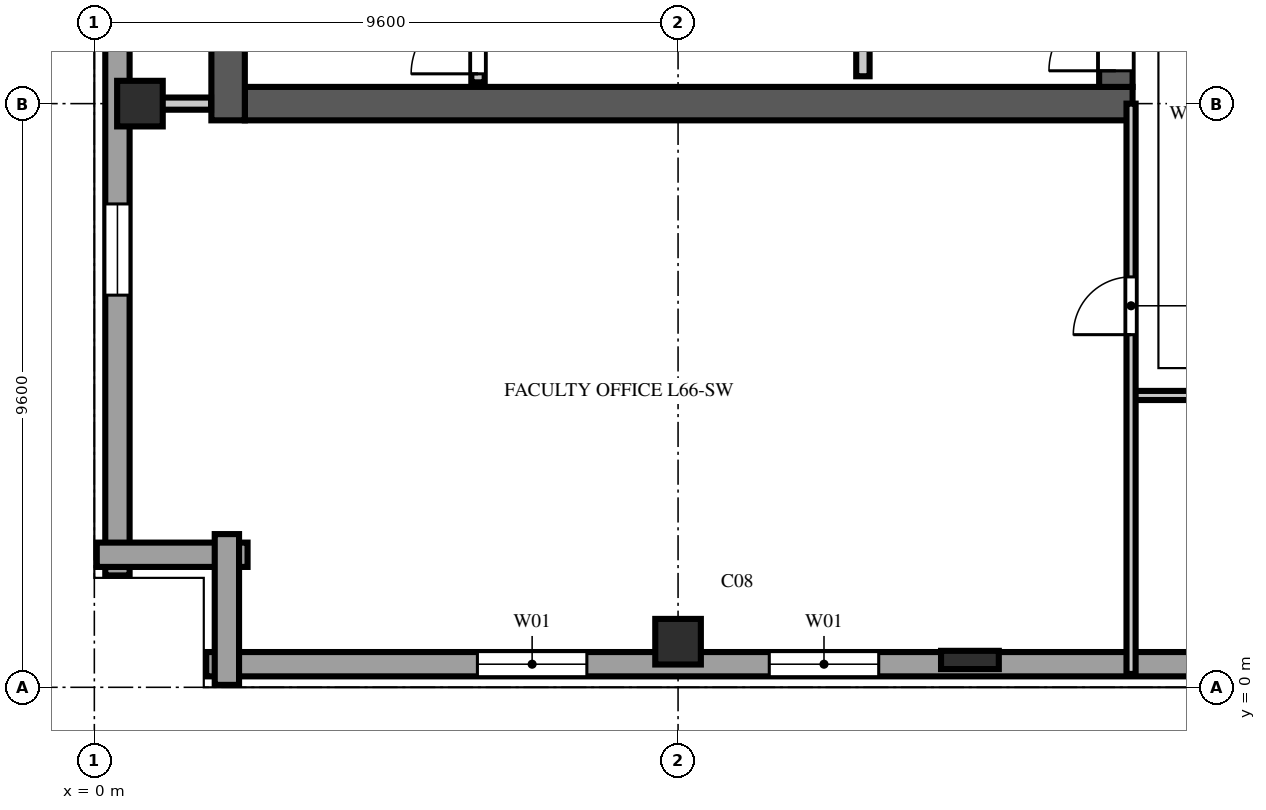
"""IFC4 building model, lengths in metres.
Left out: names, types, materials, properties, quantities, classifications, styles, units other than length and angle.
Written with IfcOpenShell. Run it as: python <this file> out.ifc"""

import sys

from ifc_helpers import new_model, si_unit, direction, frame, frame_2d, origin, origin_2d, place, context, subcontext, project, spatial, rectangle, extrude, element, fill, save


model = new_model("IFC4")
c1 = context("Model", 3, precision=1e-05, world=origin(), true_north=direction((0.0, 1.0)))
c2 = subcontext(c1, "Body", "Model", "MODEL_VIEW")
j1 = project(units=[si_unit("LENGTHUNIT", "METRE"), si_unit("PLANEANGLEUNIT", "RADIAN")], contexts=[c1])
p1 = place(None, origin())
s1 = spatial("IfcSite", under=j1, at=p1, CompositionType="ELEMENT")
p2 = place(p1, origin())
s2 = spatial("IfcBuilding", under=s1, at=p2, CompositionType="ELEMENT")
p3 = place(p2, frame((0.0, 0.0, 261.0)))
s3 = spatial("IfcBuildingStorey", under=s2, at=p3, CompositionType="ELEMENT", Elevation=261.0)
p4 = place(p3, frame((2.475, 9.6, 0.0), z_axis=(0.0, 0.0, 1.0), x_axis=(1.0, 0.0, 0.0)))
e1 = element("IfcWall", 1, at=p4, inside=s3, PredefinedType="SHEAR", context=c2, shape_type="SweptSolid", body=[
    extrude(rectangle(XDim=14.6, YDim=0.55, at=frame_2d((7.3, 0.0))), origin(), (0.0, 0.0, 1.0), 4.54),
])
p5 = place(p3, frame((2.2, 9.325, 0.0), z_axis=(0.0, 0.0, 1.0), x_axis=(0.0, 1.0, 0.0)))
e2 = element("IfcWall", 2, at=p5, inside=s3, PredefinedType="SHEAR", context=c2, shape_type="SweptSolid", body=[
    extrude(rectangle(XDim=38.95, YDim=0.55, at=frame_2d((19.475, 0.0))), origin(), (0.0, 0.0, 1.0), 4.54),
])
p6 = place(p3, frame((16.8, 9.875, 0.0), z_axis=(0.0, 0.0, 1.0), x_axis=(0.0, 1.0, 0.0)))
e3 = element("IfcWall", 3, at=p6, inside=s3, PredefinedType="SHEAR", context=c2, shape_type="SweptSolid", body=[
    extrude(rectangle(XDim=12.525, YDim=0.55, at=frame_2d((6.262, 0.0))), origin(), (0.0, 0.0, 1.0), 4.54),
])
p7 = place(p6, frame((0.265, 0.0, 0.0)))
e4 = element("IfcOpeningElement", 4, at=p7, cuts=e3, PredefinedType="OPENING", context=c2, shape_type="SweptSolid", body=[
    extrude(rectangle(XDim=1.1, YDim=2.2, at=frame_2d((0.55, 1.1))), frame((0.0, 0.287, 0.0), z_axis=(0.0, -1.0, 0.0), x_axis=(1.0, 0.0, 0.0)), (0.0, 0.0, 1.0), 0.574),
])
for number, where, z_axis, x_axis in (
    (5, (0.75, 9.6, 0.0), (0.0, 0.0, 1.0), (1.0, 0.0, 0.0)),
    (6, (9.6, 0.75, 0.0), (0.0, 0.0, 1.0), (1.0, 0.0, 0.0)),
):
    element("IfcColumn", number, at=place(p3, frame(where, z_axis=z_axis, x_axis=x_axis)), inside=s3, PredefinedType="COLUMN", context=c2, shape_type="SweptSolid", body=[
        extrude(rectangle(XDim=0.75, YDim=0.75, at=origin_2d()), origin(), (0.0, 0.0, 1.0), 4.8),
    ])
p8 = place(p3, frame((14.4, 0.45, 0.0), z_axis=(0.0, 0.0, 1.0), x_axis=(1.0, 0.0, 0.0)))
e7 = element("IfcColumn", 7, at=p8, inside=s3, PredefinedType="PILASTER", context=c2, shape_type="SweptSolid", body=[
    extrude(rectangle(XDim=0.95, YDim=0.3, at=origin_2d()), origin(), (0.0, 0.0, 1.0), 4.8),
])
p9 = place(p3, frame((1.84, 0.38, 0.0), z_axis=(0.0, 0.0, 1.0), x_axis=(1.0, 0.0, 0.0)))
e8 = element("IfcWall", 8, at=p9, inside=s3, PredefinedType="SOLIDWALL", context=c2, shape_type="SweptSolid", body=[
    extrude(rectangle(XDim=44.32, YDim=0.4, at=frame_2d((22.16, 0.0))), origin(), (0.0, 0.0, 1.0), 4.54),
])
p10 = place(p9, frame((4.46, 0.0, 0.85)))
e9 = element("IfcOpeningElement", 9, at=p10, cuts=e8, PredefinedType="OPENING", context=c2, shape_type="SweptSolid", body=[
    extrude(rectangle(XDim=1.8, YDim=1.85, at=frame_2d((0.9, 0.925))), frame((0.0, 0.212, 0.0), z_axis=(0.0, -1.0, 0.0), x_axis=(1.0, 0.0, 0.0)), (0.0, 0.0, 1.0), 0.424),
])
p11 = place(p9, frame((9.26, 0.0, 0.85)))
e10 = element("IfcOpeningElement", 10, at=p11, cuts=e8, PredefinedType="OPENING", context=c2, shape_type="SweptSolid", body=[
    extrude(rectangle(XDim=1.8, YDim=1.85, at=frame_2d((0.9, 0.925))), frame((0.0, 0.212, 0.0), z_axis=(0.0, -1.0, 0.0), x_axis=(1.0, 0.0, 0.0)), (0.0, 0.0, 1.0), 0.424),
])
p12 = place(p9, frame((18.86, 0.0, 0.85)))
e11 = element("IfcOpeningElement", 11, at=p12, cuts=e8, PredefinedType="OPENING", context=c2, shape_type="SweptSolid", body=[
    extrude(rectangle(XDim=1.8, YDim=1.85, at=frame_2d((0.9, 0.925))), frame((0.0, 0.212, 0.0), z_axis=(0.0, -1.0, 0.0), x_axis=(1.0, 0.0, 0.0)), (0.0, 0.0, 1.0), 0.424),
])
p13 = place(p9, frame((28.46, 0.0, 0.85)))
e12 = element("IfcOpeningElement", 12, at=p13, cuts=e8, PredefinedType="OPENING", context=c2, shape_type="SweptSolid", body=[
    extrude(rectangle(XDim=1.8, YDim=1.85, at=frame_2d((0.9, 0.925))), frame((0.0, 0.212, 0.0), z_axis=(0.0, -1.0, 0.0), x_axis=(1.0, 0.0, 0.0)), (0.0, 0.0, 1.0), 0.424),
])
p14 = place(p9, frame((33.26, 0.0, 0.85)))
e13 = element("IfcOpeningElement", 13, at=p14, cuts=e8, PredefinedType="OPENING", context=c2, shape_type="SweptSolid", body=[
    extrude(rectangle(XDim=1.8, YDim=1.85, at=frame_2d((0.9, 0.925))), frame((0.0, 0.212, 0.0), z_axis=(0.0, -1.0, 0.0), x_axis=(1.0, 0.0, 0.0)), (0.0, 0.0, 1.0), 0.424),
])
p15 = place(p9, frame((38.06, 0.0, 0.85)))
e14 = element("IfcOpeningElement", 14, at=p15, cuts=e8, PredefinedType="OPENING", context=c2, shape_type="SweptSolid", body=[
    extrude(rectangle(XDim=1.8, YDim=1.85, at=frame_2d((0.9, 0.925))), frame((0.0, 0.212, 0.0), z_axis=(0.0, -1.0, 0.0), x_axis=(1.0, 0.0, 0.0)), (0.0, 0.0, 1.0), 0.424),
])
p16 = place(p3, frame((0.38, 46.16, 0.0), z_axis=(0.0, 0.0, 1.0), x_axis=(0.0, -1.0, 0.0)))
e15 = element("IfcWall", 15, at=p16, inside=s3, PredefinedType="SOLIDWALL", context=c2, shape_type="SweptSolid", body=[
    extrude(rectangle(XDim=44.32, YDim=0.4, at=frame_2d((22.16, 0.0))), origin(), (0.0, 0.0, 1.0), 4.54),
])
p17 = place(p16, frame((4.885, 0.0, 0.9)))
e16 = element("IfcOpeningElement", 16, at=p17, cuts=e15, PredefinedType="OPENING", context=c2, shape_type="SweptSolid", body=[
    extrude(rectangle(XDim=0.95, YDim=1.85, at=frame_2d((0.475, 0.925))), frame((0.0, 0.212, 0.0), z_axis=(0.0, -1.0, 0.0), x_axis=(1.0, 0.0, 0.0)), (0.0, 0.0, 1.0), 0.424),
])
p18 = place(p16, frame((9.41, 0.0, 0.9)))
e17 = element("IfcOpeningElement", 17, at=p18, cuts=e15, PredefinedType="OPENING", context=c2, shape_type="SweptSolid", body=[
    extrude(rectangle(XDim=1.5, YDim=1.85, at=frame_2d((0.75, 0.925))), frame((0.0, 0.212, 0.0), z_axis=(0.0, -1.0, 0.0), x_axis=(1.0, 0.0, 0.0)), (0.0, 0.0, 1.0), 0.424),
])
p19 = place(p16, frame((14.485, 0.0, 0.9)))
e18 = element("IfcOpeningElement", 18, at=p19, cuts=e15, PredefinedType="OPENING", context=c2, shape_type="SweptSolid", body=[
    extrude(rectangle(XDim=0.95, YDim=1.85, at=frame_2d((0.475, 0.925))), frame((0.0, 0.212, 0.0), z_axis=(0.0, -1.0, 0.0), x_axis=(1.0, 0.0, 0.0)), (0.0, 0.0, 1.0), 0.424),
])
p20 = place(p16, frame((19.01, 0.0, 0.9)))
e19 = element("IfcOpeningElement", 19, at=p20, cuts=e15, PredefinedType="OPENING", context=c2, shape_type="SweptSolid", body=[
    extrude(rectangle(XDim=1.5, YDim=1.85, at=frame_2d((0.75, 0.925))), frame((0.0, 0.212, 0.0), z_axis=(0.0, -1.0, 0.0), x_axis=(1.0, 0.0, 0.0)), (0.0, 0.0, 1.0), 0.424),
])
p21 = place(p16, frame((24.085, 0.0, 0.9)))
e20 = element("IfcOpeningElement", 20, at=p21, cuts=e15, PredefinedType="OPENING", context=c2, shape_type="SweptSolid", body=[
    extrude(rectangle(XDim=0.95, YDim=1.85, at=frame_2d((0.475, 0.925))), frame((0.0, 0.212, 0.0), z_axis=(0.0, -1.0, 0.0), x_axis=(1.0, 0.0, 0.0)), (0.0, 0.0, 1.0), 0.424),
])
p22 = place(p16, frame((28.61, 0.0, 0.9)))
e21 = element("IfcOpeningElement", 21, at=p22, cuts=e15, PredefinedType="OPENING", context=c2, shape_type="SweptSolid", body=[
    extrude(rectangle(XDim=1.5, YDim=1.85, at=frame_2d((0.75, 0.925))), frame((0.0, 0.212, 0.0), z_axis=(0.0, -1.0, 0.0), x_axis=(1.0, 0.0, 0.0)), (0.0, 0.0, 1.0), 0.424),
])
p23 = place(p16, frame((33.685, 0.0, 0.9)))
e22 = element("IfcOpeningElement", 22, at=p23, cuts=e15, PredefinedType="OPENING", context=c2, shape_type="SweptSolid", body=[
    extrude(rectangle(XDim=0.95, YDim=1.85, at=frame_2d((0.475, 0.925))), frame((0.0, 0.212, 0.0), z_axis=(0.0, -1.0, 0.0), x_axis=(1.0, 0.0, 0.0)), (0.0, 0.0, 1.0), 0.424),
])
p24 = place(p16, frame((38.21, 0.0, 0.9)))
e23 = element("IfcOpeningElement", 23, at=p24, cuts=e15, PredefinedType="OPENING", context=c2, shape_type="SweptSolid", body=[
    extrude(rectangle(XDim=1.5, YDim=1.85, at=frame_2d((0.75, 0.925))), frame((0.0, 0.212, 0.0), z_axis=(0.0, -1.0, 0.0), x_axis=(1.0, 0.0, 0.0)), (0.0, 0.0, 1.0), 0.424),
])
for number, where, z_axis, x_axis in (
    (24, (0.04, 2.18, 0.0), (0.0, 0.0, 1.0), (1.0, 0.0, 0.0)),
    (25, (2.18, 2.52, 0.0), (0.0, 0.0, 1.0), (0.0, -1.0, 0.0)),
):
    element("IfcWall", number, at=place(p3, frame(where, z_axis=z_axis, x_axis=x_axis)), inside=s3, PredefinedType="SOLIDWALL", context=c2, shape_type="SweptSolid", body=[
        extrude(rectangle(XDim=2.48, YDim=0.4, at=frame_2d((1.24, 0.0))), origin(), (0.0, 0.0, 1.0), 4.54),
    ])
p25 = place(p3, frame((6.31, 9.95, 0.0), z_axis=(0.0, 0.0, 1.0), x_axis=(0.0, 1.0, 0.0)))
e26 = element("IfcWall", 26, at=p25, inside=s3, PredefinedType="SOLIDWALL", context=c2, shape_type="SweptSolid", body=[
    extrude(rectangle(XDim=7.81, YDim=0.22, at=frame_2d((3.905, 0.0))), origin(), (0.0, 0.0, 1.0), 4.54),
])
p26 = place(p25, frame((0.14, 0.0, 0.0)))
e27 = element("IfcOpeningElement", 27, at=p26, cuts=e26, PredefinedType="OPENING", context=c2, shape_type="SweptSolid", body=[
    extrude(rectangle(XDim=1.1, YDim=2.2, at=frame_2d((0.55, 1.1))), frame((0.0, 0.122, 0.0), z_axis=(0.0, -1.0, 0.0), x_axis=(1.0, 0.0, 0.0)), (0.0, 0.0, 1.0), 0.244),
])
p27 = place(p3, frame((12.64, 10.05, 0.0), z_axis=(0.0, 0.0, 1.0), x_axis=(0.0, 1.0, 0.0)))
e28 = element("IfcWall", 28, at=p27, inside=s3, PredefinedType="SOLIDWALL", context=c2, shape_type="SweptSolid", body=[
    extrude(rectangle(XDim=7.71, YDim=0.22, at=frame_2d((3.855, 0.0))), origin(), (0.0, 0.0, 1.0), 4.54),
])
p28 = place(p3, frame((0.85, 9.6, 0.0), z_axis=(0.0, 0.0, 1.0), x_axis=(1.0, 0.0, 0.0)))
e29 = element("IfcWall", 29, at=p28, inside=s3, PredefinedType="SOLIDWALL", context=c2, shape_type="SweptSolid", body=[
    extrude(rectangle(XDim=1.07, YDim=0.2, at=frame_2d((0.535, 0.0))), origin(), (0.0, 0.0, 1.0), 3.628),
])
p29 = place(p3, frame((17.05, 4.8, 0.0), z_axis=(0.0, 0.0, 1.0), x_axis=(1.0, 0.0, 0.0)))
e30 = element("IfcWall", 30, at=p29, inside=s3, PredefinedType="PARTITIONING", context=c2, shape_type="SweptSolid", body=[
    extrude(rectangle(XDim=2.15, YDim=0.15, at=frame_2d((1.075, 0.0))), origin(), (0.0, 0.0, 1.0), 4.54),
])
p30 = place(p3, frame((17.05, 0.22, 0.0), z_axis=(0.0, 0.0, 1.0), x_axis=(0.0, 1.0, 0.0)))
e31 = element("IfcWall", 31, at=p30, inside=s3, PredefinedType="PARTITIONING", context=c2, shape_type="SweptSolid", body=[
    extrude(rectangle(XDim=9.38, YDim=0.15, at=frame_2d((4.69, 0.0))), origin(), (0.0, 0.0, 1.0), 4.54),
])
p31 = place(p30, frame((5.58, 0.0, 0.0)))
e32 = element("IfcOpeningElement", 32, at=p31, cuts=e31, PredefinedType="OPENING", context=c2, shape_type="SweptSolid", body=[
    extrude(rectangle(XDim=0.95, YDim=2.15, at=frame_2d((0.475, 1.075))), frame((0.0, 0.087, 0.0), z_axis=(0.0, -1.0, 0.0), x_axis=(1.0, 0.0, 0.0)), (0.0, 0.0, 1.0), 0.174),
])
p32 = place(p10, origin())
e33 = element("IfcWindow", 33, at=p32, inside=s3, PartitioningType="DOUBLE_PANEL_VERTICAL", PredefinedType="WINDOW", context=c2, shape_type="SweptSolid", body=[
    extrude(rectangle(XDim=1.8, YDim=1.85, at=frame_2d((0.9, 0.925))), frame((0.0, 0.11, 0.0), z_axis=(0.0, -1.0, 0.0), x_axis=(1.0, 0.0, 0.0)), (0.0, 0.0, 1.0), 0.06),
])
fill(e9, e33)
p33 = place(p11, origin())
e34 = element("IfcWindow", 34, at=p33, inside=s3, PartitioningType="DOUBLE_PANEL_VERTICAL", PredefinedType="WINDOW", context=c2, shape_type="SweptSolid", body=[
    extrude(rectangle(XDim=1.8, YDim=1.85, at=frame_2d((0.9, 0.925))), frame((0.0, 0.11, 0.0), z_axis=(0.0, -1.0, 0.0), x_axis=(1.0, 0.0, 0.0)), (0.0, 0.0, 1.0), 0.06),
])
fill(e10, e34)
p34 = place(p24, origin())
e35 = element("IfcWindow", 35, at=p34, inside=s3, PartitioningType="DOUBLE_PANEL_VERTICAL", PredefinedType="WINDOW", context=c2, shape_type="SweptSolid", body=[
    extrude(rectangle(XDim=1.5, YDim=1.85, at=frame_2d((0.75, 0.925))), frame((0.0, 0.11, 0.0), z_axis=(0.0, -1.0, 0.0), x_axis=(1.0, 0.0, 0.0)), (0.0, 0.0, 1.0), 0.06),
])
fill(e23, e35)
p35 = place(p26, origin())
e36 = element("IfcDoor", 36, at=p35, inside=s3, OperationType="SINGLE_SWING_LEFT", PredefinedType="DOOR", context=c2, shape_type="SweptSolid", body=[
    extrude(rectangle(XDim=1.1, YDim=2.2, at=frame_2d((0.55, 1.1))), frame((0.0, 0.025, 0.0), z_axis=(0.0, -1.0, 0.0), x_axis=(1.0, 0.0, 0.0)), (0.0, 0.0, 1.0), 0.05),
])
fill(e27, e36)
p36 = place(p7, origin())
e37 = element("IfcDoor", 37, at=p36, inside=s3, OperationType="SINGLE_SWING_LEFT", PredefinedType="DOOR", context=c2, shape_type="SweptSolid", body=[
    extrude(rectangle(XDim=1.1, YDim=2.2, at=frame_2d((0.55, 1.1))), frame((0.0, 0.025, 0.0), z_axis=(0.0, -1.0, 0.0), x_axis=(1.0, 0.0, 0.0)), (0.0, 0.0, 1.0), 0.05),
])
fill(e4, e37)
p37 = place(p31, origin())
e38 = element("IfcDoor", 38, at=p37, inside=s3, OperationType="SINGLE_SWING_LEFT", PredefinedType="DOOR", context=c2, shape_type="SweptSolid", body=[
    extrude(rectangle(XDim=0.95, YDim=2.15, at=frame_2d((0.475, 1.075))), frame((0.0, 0.025, 0.0), z_axis=(0.0, -1.0, 0.0), x_axis=(1.0, 0.0, 0.0)), (0.0, 0.0, 1.0), 0.05),
])
fill(e32, e38)
save(model, sys.argv[1])
